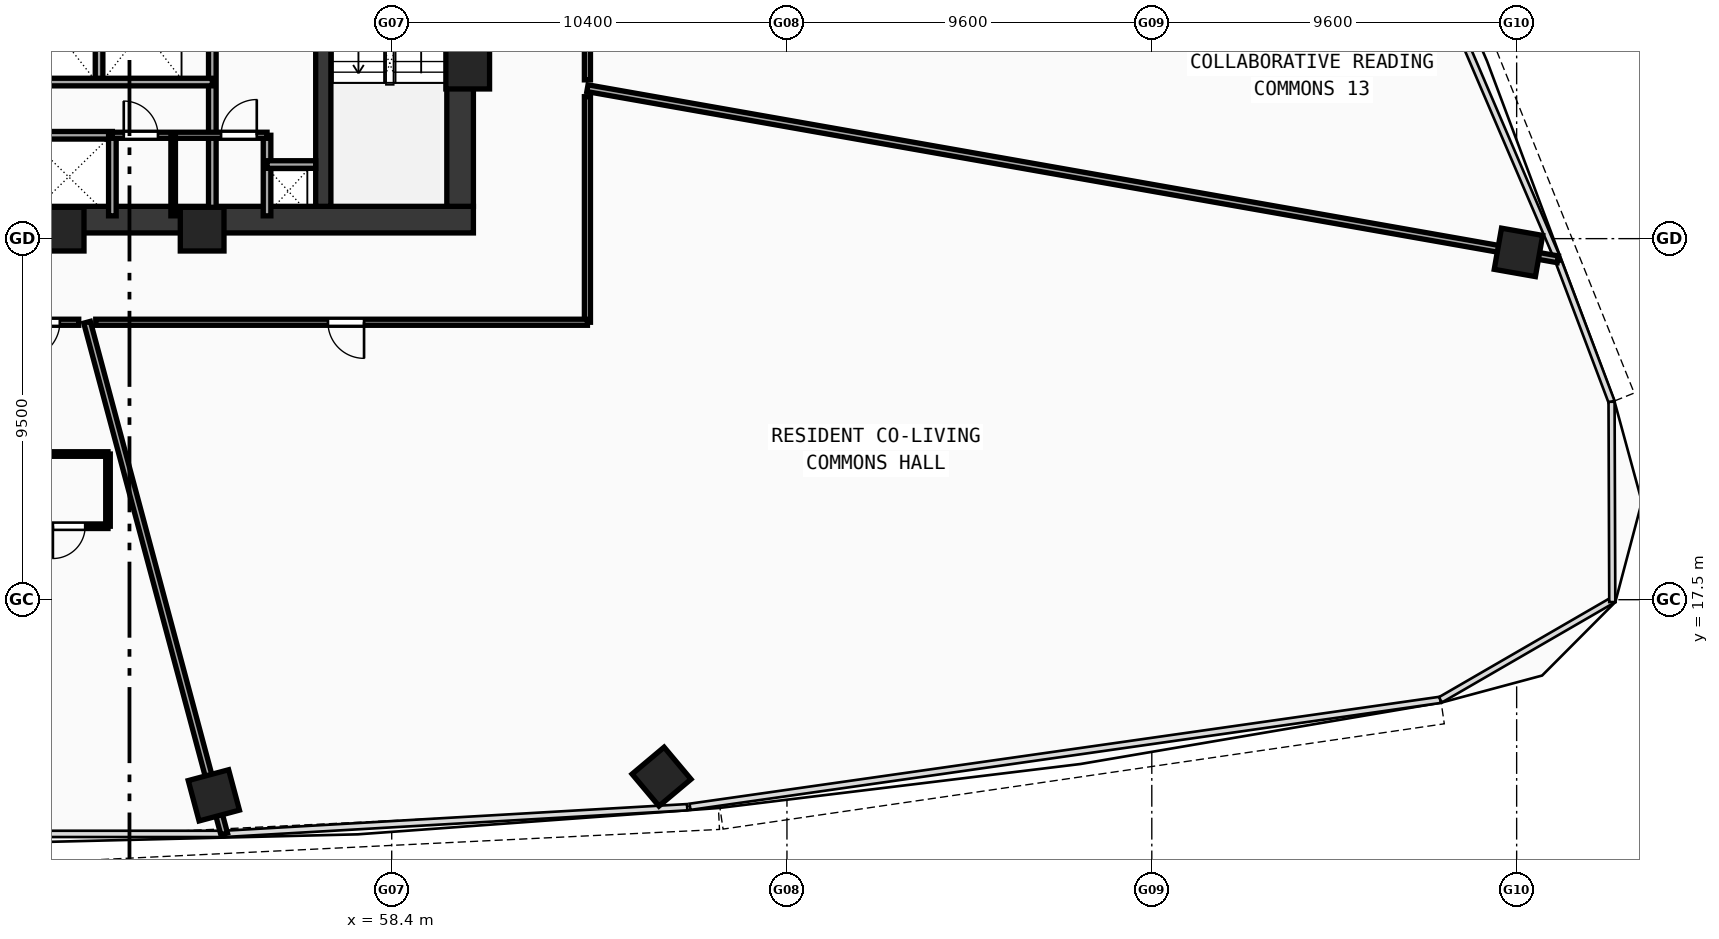
"""IFC4 building model, lengths in metres.
Left out: names, types, materials, properties, quantities, classifications, styles, units other than length and angle.
Written with IfcOpenShell. Run it as: python <this file> out.ifc"""

import sys

from ifc_helpers import new_model, si_unit, direction, frame, frame_2d, origin, origin_with_axes, origin_2d, place, context, subcontext, project, spatial, rectangle, hollow_rectangle, extrude, source, transform, mapped, element, fill, save


model = new_model("IFC4")
c1 = context("Model", 3, precision=1e-05, world=origin(), true_north=direction((0.0, 1.0)))
c2 = subcontext(c1, "Body", "Model", "MODEL_VIEW")
j1 = project(units=[si_unit("LENGTHUNIT", "METRE"), si_unit("PLANEANGLEUNIT", "RADIAN")], contexts=[c1])
p1 = place(None, origin())
s1 = spatial("IfcSite", under=j1, at=p1, CompositionType="ELEMENT")
p2 = place(p1, origin())
s2 = spatial("IfcBuilding", under=s1, at=p2, CompositionType="ELEMENT")
p3 = place(p2, frame((0.0, 0.0, 63.07)))
s3 = spatial("IfcBuildingStorey", under=s2, at=p3, CompositionType="ELEMENT", Elevation=63.07)
p4 = place(p3, frame((35.45, 27.5, 0.0), z_axis=(0.0, 0.0, 1.0), x_axis=(1.0, 0.0, 0.0)))
e1 = element("IfcWall", 1, at=p4, inside=s3, PredefinedType="SHEAR", context=c2, shape_type="SweptSolid", body=[
    extrude(rectangle(XDim=25.1, YDim=0.7, at=frame_2d((12.55, 0.0))), origin(), (0.0, 0.0, 1.0), 3.37),
])
p5 = place(p3, frame((60.2, 27.85, 0.0), z_axis=(0.0, 0.0, 1.0), x_axis=(0.0, 1.0, 0.0)))
e2 = element("IfcWall", 2, at=p5, inside=s3, PredefinedType="SHEAR", context=c2, shape_type="SweptSolid", body=[
    extrude(rectangle(XDim=12.0, YDim=0.7, at=frame_2d((6.0, 0.0))), origin(), (0.0, 0.0, 1.0), 3.37),
])
p6 = place(p3, frame((56.6, 27.85, 0.0), z_axis=(0.0, 0.0, 1.0), x_axis=(0.0, 1.0, 0.0)))
e3 = element("IfcWall", 3, at=p6, inside=s3, PredefinedType="SHEAR", context=c2, shape_type="SweptSolid", body=[
    extrude(rectangle(XDim=12.0, YDim=0.4, at=frame_2d((6.0, 0.0))), origin(), (0.0, 0.0, 1.0), 3.37),
])
p7 = place(p6, frame((9.9, 0.0, 0.0)))
e4 = element("IfcOpeningElement", 4, at=p7, cuts=e3, PredefinedType="OPENING", context=c2, shape_type="SweptSolid", body=[
    extrude(rectangle(XDim=1.1, YDim=2.1, at=frame_2d((0.55, 1.05))), frame((0.0, 0.21, 0.0), z_axis=(0.0, -1.0, 0.0), x_axis=(1.0, 0.0, 0.0)), (0.0, 0.0, 1.0), 0.42),
])
m1 = source(origin(), c2, "Body", "SweptSolid", [
    extrude(hollow_rectangle(XDim=1.15, YDim=1.15, WallThickness=0.048, at=origin_2d()), origin(), (0.0, 0.0, 1.0), 3.63),
])
for number, where, z_axis, x_axis in (
    (5, (49.729, 27.25, -0.26), (0.0, 0.0, 1.0), (1.0, 0.0, 0.0)),
    (6, (53.412, 27.25, -0.26), (0.0, 0.0, 1.0), (1.0, 0.0, 0.0)),
    (7, (60.4, 31.513, -0.26), (0.0, 0.0, 1.0), (1.0, 0.0, 0.0)),
):
    element("IfcColumn", number, at=place(p3, frame(where, z_axis=z_axis, x_axis=x_axis)), inside=s3, PredefinedType="COLUMN", context=c2, shape_type="MappedRepresentation", body=[
        mapped(m1, transform((0.0, 0.0, 0.0), scale=1.0)),
    ])
m2 = source(origin(), c2, "Body", "SweptSolid", [
    extrude(hollow_rectangle(XDim=1.1, YDim=1.1, WallThickness=0.045, at=origin_2d()), origin(), (0.0, 0.0, 1.0), 3.63),
])
for number, where, z_axis, x_axis in (
    (8, (53.72, 12.352, -0.26), (0.0, 0.0, 1.0), (0.966, 0.259, 0.0)),
    (9, (65.5, 12.844, -0.26), (0.0, 0.0, 1.0), (0.766, 0.643, 0.0)),
    (10, (88.048, 26.638, -0.26), (0.0, 0.0, 1.0), (0.174, 0.985, 0.0)),
):
    element("IfcColumn", number, at=place(p3, frame(where, z_axis=z_axis, x_axis=x_axis)), inside=s3, PredefinedType="COLUMN", context=c2, shape_type="MappedRepresentation", body=[
        mapped(m2, transform((0.0, 0.0, 0.0), scale=1.0)),
    ])
p8 = place(p3, frame((53.68, 27.6, 0.0), z_axis=(0.0, 0.0, 1.0), x_axis=(0.0, 1.0, 0.0)))
e11 = element("IfcWall", 11, at=p8, inside=s3, PredefinedType="SOLIDWALL", context=c2, shape_type="SweptSolid", body=[
    extrude(rectangle(XDim=9.05, YDim=0.2, at=frame_2d((4.525, 0.0))), origin(), (0.0, 0.0, 1.0), 3.37),
])
p9 = place(p8, frame((6.9, 0.0, 0.0)))
e12 = element("IfcOpeningElement", 12, at=p9, cuts=e11, PredefinedType="OPENING", context=c2, shape_type="SweptSolid", body=[
    extrude(rectangle(XDim=1.05, YDim=2.1, at=frame_2d((0.525, 1.05))), frame((0.0, 0.11, 0.0), z_axis=(0.0, -1.0, 0.0), x_axis=(1.0, 0.0, 0.0)), (0.0, 0.0, 1.0), 0.22),
])
p10 = place(p3, frame((50.7, 31.12, 0.0), z_axis=(0.0, 0.0, 1.0), x_axis=(0.0, 1.0, 0.0)))
e13 = element("IfcWall", 13, at=p10, inside=s3, PredefinedType="SOLIDWALL", context=c2, shape_type="SweptSolid", body=[
    extrude(rectangle(XDim=2.7, YDim=0.2, at=frame_2d((1.35, 0.0))), origin(), (0.0, 0.0, 1.0), 3.37),
])
p11 = place(p3, frame((43.85, 29.72, 0.0), z_axis=(0.0, 0.0, 1.0), x_axis=(1.0, 0.0, 0.0)))
e14 = element("IfcWall", 14, at=p11, inside=s3, PredefinedType="SOLIDWALL", context=c2, shape_type="SweptSolid", body=[
    extrude(rectangle(XDim=7.2, YDim=0.2, at=frame_2d((3.6, 0.0))), origin(), (0.0, 0.0, 1.0), 3.37),
])
p12 = place(p3, frame((51.05, 27.6, 0.0), z_axis=(0.0, 0.0, 1.0), x_axis=(0.0, 1.0, 0.0)))
e15 = element("IfcWall", 15, at=p12, inside=s3, PredefinedType="SOLIDWALL", context=c2, shape_type="SweptSolid", body=[
    extrude(rectangle(XDim=2.12, YDim=0.2, at=frame_2d((1.06, 0.0))), origin(), (0.0, 0.0, 1.0), 3.37),
])
p13 = place(p3, frame((43.85, 31.12, 0.0), z_axis=(0.0, 0.0, 1.0), x_axis=(1.0, 0.0, 0.0)))
e16 = element("IfcWall", 16, at=p13, inside=s3, PredefinedType="SOLIDWALL", context=c2, shape_type="SweptSolid", body=[
    extrude(rectangle(XDim=9.83, YDim=0.2, at=frame_2d((4.915, 0.0))), origin(), (0.0, 0.0, 1.0), 3.37),
])
p14 = place(p3, frame((55.12, 27.6, 0.0), z_axis=(0.0, 0.0, 1.0), x_axis=(0.0, 1.0, 0.0)))
e17 = element("IfcWall", 17, at=p14, inside=s3, PredefinedType="SOLIDWALL", context=c2, shape_type="SweptSolid", body=[
    extrude(rectangle(XDim=2.12, YDim=0.2, at=frame_2d((1.06, 0.0))), origin(), (0.0, 0.0, 1.0), 3.37),
])
p15 = place(p3, frame((55.12, 28.95, 0.0), z_axis=(0.0, 0.0, 1.0), x_axis=(1.0, 0.0, 0.0)))
e18 = element("IfcWall", 18, at=p15, inside=s3, PredefinedType="SOLIDWALL", context=c2, shape_type="SweptSolid", body=[
    extrude(rectangle(XDim=1.28, YDim=0.2, at=frame_2d((0.64, 0.0))), origin(), (0.0, 0.0, 1.0), 3.37),
])
p16 = place(p3, frame((51.05, 29.72, 0.0), z_axis=(0.0, 0.0, 1.0), x_axis=(1.0, 0.0, 0.0)))
e19 = element("IfcWall", 19, at=p16, inside=s3, PredefinedType="PARTITIONING", context=c2, shape_type="SweptSolid", body=[
    extrude(rectangle(XDim=4.07, YDim=0.16, at=frame_2d((2.035, 0.0))), origin(), (0.0, 0.0, 1.0), 3.37),
])
p17 = place(p16, frame((0.3, 0.0, 0.0)))
e20 = element("IfcOpeningElement", 20, at=p17, cuts=e19, PredefinedType="OPENING", context=c2, shape_type="SweptSolid", body=[
    extrude(rectangle(XDim=0.9, YDim=2.1, at=frame_2d((0.45, 1.05))), frame((0.0, 0.09, 0.0), z_axis=(0.0, -1.0, 0.0), x_axis=(1.0, 0.0, 0.0)), (0.0, 0.0, 1.0), 0.18),
])
p18 = place(p16, frame((2.86, 0.0, 0.0)))
e21 = element("IfcOpeningElement", 21, at=p18, cuts=e19, PredefinedType="OPENING", context=c2, shape_type="SweptSolid", body=[
    extrude(rectangle(XDim=0.94, YDim=2.1, at=frame_2d((0.47, 1.05))), frame((0.0, 0.09, 0.0), z_axis=(0.0, -1.0, 0.0), x_axis=(1.0, 0.0, 0.0)), (0.0, 0.0, 1.0), 0.18),
])
p19 = place(p3, frame((52.65, 27.6, 0.0), z_axis=(0.0, 0.0, 1.0), x_axis=(0.0, 1.0, 0.0)))
e22 = element("IfcWall", 22, at=p19, inside=s3, PredefinedType="PARTITIONING", context=c2, shape_type="SweptSolid", body=[
    extrude(rectangle(XDim=2.12, YDim=0.12, at=frame_2d((1.06, 0.0))), origin(), (0.0, 0.0, 1.0), 3.37),
])
p20 = place(p3, frame((50.385, 24.8, 0.0), z_axis=(0.0, 0.0, 1.0), x_axis=(0.258819267056, -0.965925766817, 0.0)))
e23 = element("IfcWall", 23, at=p20, inside=s3, PredefinedType="PARTITIONING", context=c2, shape_type="SweptSolid", body=[
    extrude(rectangle(XDim=13.937, YDim=0.18, at=frame_2d((6.969, 0.0))), origin(), (0.0, 0.0, 1.0), 2.67),
])
p21 = place(p3, frame((63.55, 30.958, 0.0), z_axis=(0.0, 0.0, 1.0), x_axis=(0.984809239356, -0.173639747982, 0.0)))
e24 = element("IfcWall", 24, at=p21, inside=s3, PredefinedType="PARTITIONING", context=c2, shape_type="SweptSolid", body=[
    extrude(rectangle(XDim=25.926, YDim=0.18, at=frame_2d((12.963, 0.0))), origin(), (0.0, 0.0, 1.0), 2.67),
])
p22 = place(p3, frame((63.55, 34.023, 0.0), z_axis=(0.0, 0.0, 1.0), x_axis=(0.0, -1.0, 0.0)))
e25 = element("IfcWall", 25, at=p22, inside=s3, PredefinedType="PARTITIONING", context=c2, shape_type="SweptSolid", body=[
    extrude(rectangle(XDim=2.845, YDim=0.16, at=frame_2d((1.423, 0.0))), origin(), (0.0, 0.0, 1.0), 3.37),
])
p23 = place(p22, frame((0.948, 0.0, 0.0)))
e26 = element("IfcOpeningElement", 26, at=p23, cuts=e25, PredefinedType="OPENING", context=c2, shape_type="SweptSolid", body=[
    extrude(rectangle(XDim=0.95, YDim=2.1, at=frame_2d((0.475, 1.05))), frame((0.0, 0.09, 0.0), z_axis=(0.0, -1.0, 0.0), x_axis=(1.0, 0.0, 0.0)), (0.0, 0.0, 1.0), 0.18),
])
p24 = place(p3, frame((63.55, 30.735, 0.0), z_axis=(0.0, 0.0, 1.0), x_axis=(0.0, -1.0, 0.0)))
e27 = element("IfcWall", 27, at=p24, inside=s3, PredefinedType="PARTITIONING", context=c2, shape_type="SweptSolid", body=[
    extrude(rectangle(XDim=5.935, YDim=0.16, at=frame_2d((2.967, 0.0))), origin(), (0.0, 0.0, 1.0), 2.97),
])
p25 = place(p3, frame((63.55, 24.8, 0.0), z_axis=(0.0, 0.0, 1.0), x_axis=(-1.0, 0.0, 0.0)))
e28 = element("IfcWall", 28, at=p25, inside=s3, PredefinedType="PARTITIONING", context=c2, shape_type="SweptSolid", body=[
    extrude(rectangle(XDim=12.938, YDim=0.16, at=frame_2d((6.469, 0.0))), origin(), (0.0, 0.0, 1.0), 2.67),
])
p26 = place(p25, frame((5.878, 0.0, 0.0)))
e29 = element("IfcOpeningElement", 29, at=p26, cuts=e28, PredefinedType="OPENING", context=c2, shape_type="SweptSolid", body=[
    extrude(rectangle(XDim=0.95, YDim=2.1, at=frame_2d((0.475, 1.05))), frame((0.0, 0.09, 0.0), z_axis=(0.0, -1.0, 0.0), x_axis=(1.0, 0.0, 0.0)), (0.0, 0.0, 1.0), 0.18),
])
p27 = place(p3, frame((50.165, 24.8, 0.0), z_axis=(0.0, 0.0, 1.0), x_axis=(-1.0, 0.0, 0.0)))
e30 = element("IfcWall", 30, at=p27, inside=s3, PredefinedType="PARTITIONING", context=c2, shape_type="SweptSolid", body=[
    extrude(rectangle(XDim=1.945, YDim=0.16, at=frame_2d((0.972, 0.0))), origin(), (0.0, 0.0, 1.0), 3.37),
])
p28 = place(p27, frame((0.498, 0.0, 0.0)))
e31 = element("IfcOpeningElement", 31, at=p28, cuts=e30, PredefinedType="OPENING", context=c2, shape_type="SweptSolid", body=[
    extrude(rectangle(XDim=0.95, YDim=2.1, at=frame_2d((0.475, 1.05))), frame((0.0, 0.09, 0.0), z_axis=(0.0, -1.0, 0.0), x_axis=(1.0, 0.0, 0.0)), (0.0, 0.0, 1.0), 0.18),
])
p29 = place(p3, frame((48.885, 19.433, 0.0), z_axis=(0.0, 0.0, 1.0), x_axis=(1.0, 0.0, 0.0)))
e32 = element("IfcWall", 32, at=p29, inside=s3, PredefinedType="PARTITIONING", context=c2, shape_type="SweptSolid", body=[
    extrude(rectangle(XDim=2.05, YDim=0.12, at=frame_2d((1.025, 0.0))), origin(), (0.0, 0.0, 1.0), 3.37),
])
p30 = place(p29, frame((0.6, 0.0, 0.0)))
e33 = element("IfcOpeningElement", 33, at=p30, cuts=e32, PredefinedType="OPENING", context=c2, shape_type="SweptSolid", body=[
    extrude(rectangle(XDim=0.85, YDim=2.1, at=frame_2d((0.425, 1.05))), frame((0.0, 0.07, 0.0), z_axis=(0.0, -1.0, 0.0), x_axis=(1.0, 0.0, 0.0)), (0.0, 0.0, 1.0), 0.14),
])
p31 = place(p3, frame((50.935, 19.433, 0.0), z_axis=(0.0, 0.0, 1.0), x_axis=(0.0, 1.0, 0.0)))
e34 = element("IfcWall", 34, at=p31, inside=s3, PredefinedType="PARTITIONING", context=c2, shape_type="SweptSolid", body=[
    extrude(rectangle(XDim=1.9, YDim=0.12, at=frame_2d((0.95, 0.0))), origin(), (0.0, 0.0, 1.0), 3.37),
])
p32 = place(p3, frame((50.935, 21.333, 0.0), z_axis=(0.0, 0.0, 1.0), x_axis=(-1.0, 0.0, 0.0)))
e35 = element("IfcWall", 35, at=p32, inside=s3, PredefinedType="PARTITIONING", context=c2, shape_type="SweptSolid", body=[
    extrude(rectangle(XDim=2.05, YDim=0.12, at=frame_2d((1.025, 0.0))), origin(), (0.0, 0.0, 1.0), 3.37),
])
m3 = source(origin(), c2, "Body", "SweptSolid", [
    extrude(rectangle(XDim=0.9, YDim=2.1, at=frame_2d((0.45, 1.05))), frame((0.0, 0.025, 0.0), z_axis=(0.0, -1.0, 0.0), x_axis=(1.0, 0.0, 0.0)), (0.0, 0.0, 1.0), 0.05),
])
p33 = place(p17, origin_with_axes())
e36 = element("IfcDoor", 36, at=p33, inside=s3, OperationType="SINGLE_SWING_LEFT", PredefinedType="DOOR", context=c2, shape_type="MappedRepresentation", body=[
    mapped(m3, transform((0.0, 0.0, 0.0), scale=1.0)),
])
fill(e20, e36)
m4 = source(origin(), c2, "Body", "SweptSolid", [
    extrude(rectangle(XDim=0.94, YDim=2.1, at=frame_2d((0.47, 1.05))), frame((0.0, 0.025, 0.0), z_axis=(0.0, -1.0, 0.0), x_axis=(1.0, 0.0, 0.0)), (0.0, 0.0, 1.0), 0.05),
])
p34 = place(p18, origin_with_axes())
e37 = element("IfcDoor", 37, at=p34, inside=s3, OperationType="SINGLE_SWING_RIGHT", PredefinedType="DOOR", context=c2, shape_type="MappedRepresentation", body=[
    mapped(m4, transform((0.0, 0.0, 0.0), scale=1.0)),
])
fill(e21, e37)
m5 = source(origin(), c2, "Body", "SweptSolid", [
    extrude(rectangle(XDim=0.95, YDim=2.1, at=frame_2d((0.475, 1.05))), frame((0.0, 0.025, 0.0), z_axis=(0.0, -1.0, 0.0), x_axis=(1.0, 0.0, 0.0)), (0.0, 0.0, 1.0), 0.05),
])
p35 = place(p28, origin_with_axes())
e38 = element("IfcDoor", 38, at=p35, inside=s3, OperationType="SINGLE_SWING_RIGHT", PredefinedType="DOOR", context=c2, shape_type="MappedRepresentation", body=[
    mapped(m5, transform((0.0, 0.0, 0.0), scale=1.0)),
])
fill(e31, e38)
m6 = source(origin(), c2, "Body", "SweptSolid", [
    extrude(rectangle(XDim=0.85, YDim=2.1, at=frame_2d((0.425, 1.05))), frame((0.0, 0.025, 0.0), z_axis=(0.0, -1.0, 0.0), x_axis=(1.0, 0.0, 0.0)), (0.0, 0.0, 1.0), 0.05),
])
p36 = place(p30, frame((0.85, 0.0, 0.0), z_axis=(0.0, 0.0, 1.0), x_axis=(-1.0, 0.0, 0.0)))
e39 = element("IfcDoor", 39, at=p36, inside=s3, OperationType="SINGLE_SWING_RIGHT", PredefinedType="DOOR", context=c2, shape_type="MappedRepresentation", body=[
    mapped(m6, transform((0.0, 0.0, 0.0), scale=1.0)),
])
fill(e33, e39)
p37 = place(p26, origin_with_axes())
e40 = element("IfcDoor", 40, at=p37, inside=s3, OperationType="SINGLE_SWING_LEFT", PredefinedType="DOOR", context=c2, shape_type="MappedRepresentation", body=[
    mapped(m5, transform((0.0, 0.0, 0.0), scale=1.0)),
])
fill(e29, e40)
save(model, sys.argv[1])
